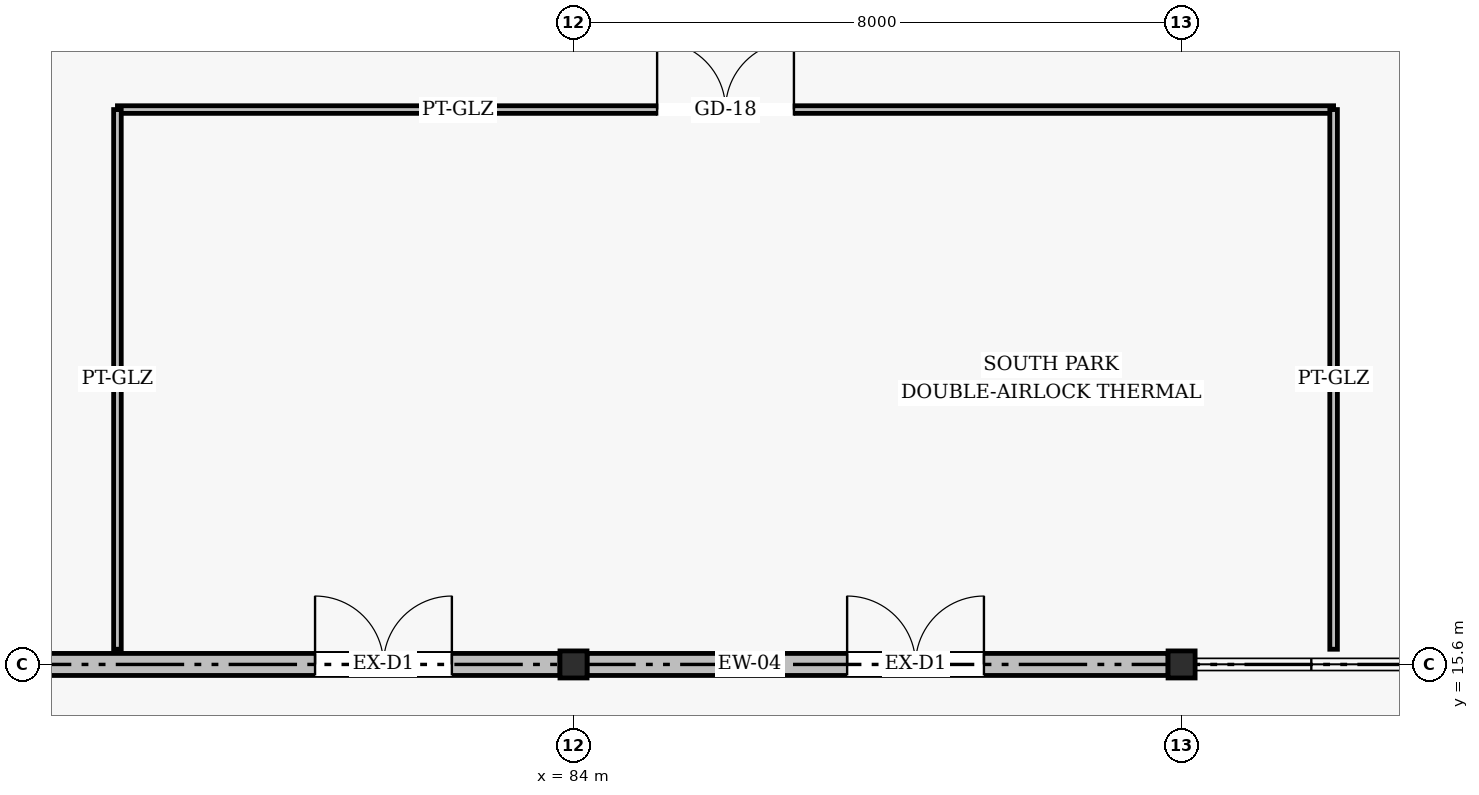
"""IFC4 building model, lengths in metres.
Left out: names, types, materials, properties, quantities, classifications, styles, units other than length and angle.
Written with IfcOpenShell. Run it as: python <this file> out.ifc"""

import sys

from ifc_helpers import new_model, si_unit, direction, frame, frame_2d, origin, origin_2d, place, context, subcontext, project, spatial, rectangle, hollow_circle, extrude, element, fill, save


model = new_model("IFC4")
c1 = context("Model", 3, precision=1e-05, world=origin(), true_north=direction((0.0, 1.0)))
c2 = subcontext(c1, "Body", "Model", "MODEL_VIEW")
j1 = project(units=[si_unit("LENGTHUNIT", "METRE"), si_unit("PLANEANGLEUNIT", "RADIAN")], contexts=[c1])
p1 = place(None, origin())
s1 = spatial("IfcSite", under=j1, at=p1, CompositionType="ELEMENT")
p2 = place(p1, origin())
s2 = spatial("IfcBuilding", under=s1, at=p2, CompositionType="ELEMENT")
p3 = place(p2, origin())
s3 = spatial("IfcBuildingStorey", under=s2, at=p3, CompositionType="ELEMENT", Elevation=0.0)
for number, where, z_axis, x_axis in (
    (1, (84.0, 15.6, 0.0), (0.0, 0.0, 1.0), (1.0, 0.0, 0.0)),
    (2, (92.0, 15.6, 0.0), (0.0, 0.0, 1.0), (1.0, 0.0, 0.0)),
):
    element("IfcColumn", number, at=place(p3, frame(where, z_axis=z_axis, x_axis=x_axis)), inside=s3, PredefinedType="COLUMN", context=c2, shape_type="SweptSolid", body=[
        extrude(hollow_circle(Radius=0.178, WallThickness=0.012, at=origin_2d()), origin(), (0.0, 0.0, 1.0), 4.8),
    ])
p4 = place(p3, frame((76.178, 15.6, 0.0), z_axis=(0.0, 0.0, 1.0), x_axis=(1.0, 0.0, 0.0)))
e3 = element("IfcWall", 3, at=p4, inside=s3, PredefinedType="SOLIDWALL", context=c2, shape_type="SweptSolid", body=[
    extrude(rectangle(XDim=7.645, YDim=0.29, at=frame_2d((3.822, 0.0))), origin(), (0.0, 0.0, 1.0), 4.06),
])
p5 = place(p4, frame((4.422, 0.0, 0.0)))
e4 = element("IfcOpeningElement", 4, at=p5, cuts=e3, PredefinedType="OPENING", context=c2, shape_type="SweptSolid", body=[
    extrude(rectangle(XDim=1.8, YDim=2.4, at=frame_2d((0.9, 1.2))), frame((0.0, 0.155, 0.0), z_axis=(0.0, -1.0, 0.0), x_axis=(1.0, 0.0, 0.0)), (0.0, 0.0, 1.0), 0.31),
])
p6 = place(p3, frame((84.178, 15.6, 0.0), z_axis=(0.0, 0.0, 1.0), x_axis=(1.0, 0.0, 0.0)))
e5 = element("IfcWall", 5, at=p6, inside=s3, PredefinedType="SOLIDWALL", context=c2, shape_type="SweptSolid", body=[
    extrude(rectangle(XDim=7.645, YDim=0.29, at=frame_2d((3.822, 0.0))), origin(), (0.0, 0.0, 1.0), 4.06),
])
p7 = place(p6, frame((3.422, 0.0, 0.0)))
e6 = element("IfcOpeningElement", 6, at=p7, cuts=e5, PredefinedType="OPENING", context=c2, shape_type="SweptSolid", body=[
    extrude(rectangle(XDim=1.8, YDim=2.4, at=frame_2d((0.9, 1.2))), frame((0.0, 0.155, 0.0), z_axis=(0.0, -1.0, 0.0), x_axis=(1.0, 0.0, 0.0)), (0.0, 0.0, 1.0), 0.31),
])
p8 = place(p3, frame((78.0, 22.9, 0.0), z_axis=(0.0, 0.0, 1.0), x_axis=(1.0, 0.0, 0.0)))
e7 = element("IfcWall", 7, at=p8, inside=s3, PredefinedType="PARTITIONING", context=c2, shape_type="SweptSolid", body=[
    extrude(rectangle(XDim=16.0, YDim=0.1, at=frame_2d((8.0, 0.0))), origin(), (0.0, 0.0, 1.0), 4.56),
])
p9 = place(p8, frame((7.1, 0.0, 0.0)))
e8 = element("IfcOpeningElement", 8, at=p9, cuts=e7, PredefinedType="OPENING", context=c2, shape_type="SweptSolid", body=[
    extrude(rectangle(XDim=1.8, YDim=2.2, at=frame_2d((0.9, 1.1))), frame((0.0, 0.06, 0.0), z_axis=(0.0, -1.0, 0.0), x_axis=(1.0, 0.0, 0.0)), (0.0, 0.0, 1.0), 0.12),
])
for number, where, z_axis, x_axis in (
    (9, (78.0, 15.8, 0.0), (0.0, 0.0, 1.0), (0.0, 1.0, 0.0)),
    (10, (94.0, 15.8, 0.0), (0.0, 0.0, 1.0), (0.0, 1.0, 0.0)),
):
    element("IfcWall", number, at=place(p3, frame(where, z_axis=z_axis, x_axis=x_axis)), inside=s3, PredefinedType="PARTITIONING", context=c2, shape_type="SweptSolid", body=[
        extrude(rectangle(XDim=7.1, YDim=0.1, at=frame_2d((3.55, 0.0))), origin(), (0.0, 0.0, 1.0), 4.56),
    ])
p10 = place(p5, frame((1.8, 0.0, 0.0), z_axis=(0.0, 0.0, 1.0), x_axis=(-1.0, 0.0, 0.0)))
e11 = element("IfcDoor", 11, at=p10, inside=s3, OperationType="DOUBLE_DOOR_SINGLE_SWING", PredefinedType="DOOR", context=c2, shape_type="SweptSolid", body=[
    extrude(rectangle(XDim=1.8, YDim=2.4, at=frame_2d((0.9, 1.2))), frame((0.0, 0.025, 0.0), z_axis=(0.0, -1.0, 0.0), x_axis=(1.0, 0.0, 0.0)), (0.0, 0.0, 1.0), 0.05),
])
fill(e4, e11)
p11 = place(p7, frame((1.8, 0.0, 0.0), z_axis=(0.0, 0.0, 1.0), x_axis=(-1.0, 0.0, 0.0)))
e12 = element("IfcDoor", 12, at=p11, inside=s3, OperationType="DOUBLE_DOOR_SINGLE_SWING", PredefinedType="DOOR", context=c2, shape_type="SweptSolid", body=[
    extrude(rectangle(XDim=1.8, YDim=2.4, at=frame_2d((0.9, 1.2))), frame((0.0, 0.025, 0.0), z_axis=(0.0, -1.0, 0.0), x_axis=(1.0, 0.0, 0.0)), (0.0, 0.0, 1.0), 0.05),
])
fill(e6, e12)
p12 = place(p9, origin())
e13 = element("IfcDoor", 13, at=p12, inside=s3, OperationType="DOUBLE_DOOR_SINGLE_SWING", PredefinedType="DOOR", context=c2, shape_type="SweptSolid", body=[
    extrude(rectangle(XDim=1.8, YDim=2.2, at=frame_2d((0.9, 1.1))), frame((0.0, 0.025, 0.0), z_axis=(0.0, -1.0, 0.0), x_axis=(1.0, 0.0, 0.0)), (0.0, 0.0, 1.0), 0.05),
])
fill(e8, e13)
save(model, sys.argv[1])
